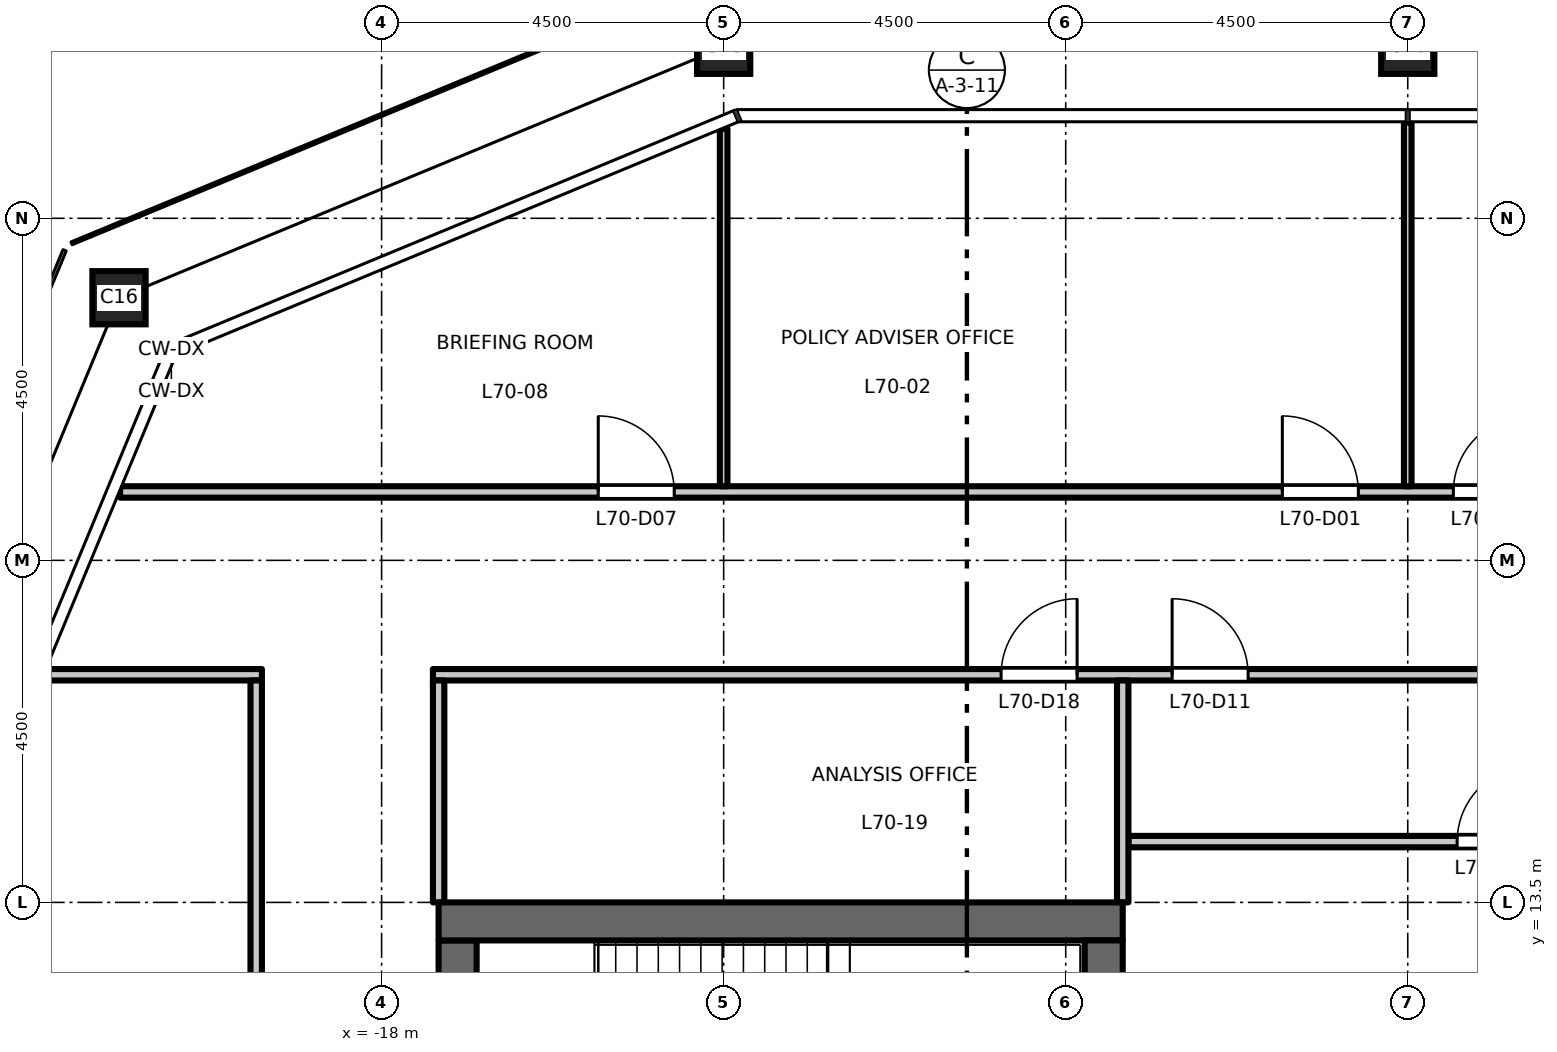
"""IFC4 building model, lengths in metres.
Left out: names, types, materials, properties, quantities, classifications, styles, units other than length and angle.
Written with IfcOpenShell. Run it as: python <this file> out.ifc"""

import sys

from ifc_helpers import new_model, si_unit, direction, frame, frame_2d, origin, origin_2d, place, context, subcontext, project, spatial, rectangle, hollow_rectangle, extrude, element, fill, save


model = new_model("IFC4")
c1 = context("Model", 3, precision=1e-05, world=origin(), true_north=direction((0.0, 1.0)))
c2 = subcontext(c1, "Body", "Model", "MODEL_VIEW")
j1 = project(units=[si_unit("LENGTHUNIT", "METRE"), si_unit("PLANEANGLEUNIT", "RADIAN")], contexts=[c1])
p1 = place(None, origin())
s1 = spatial("IfcSite", under=j1, at=p1, CompositionType="ELEMENT")
p2 = place(p1, origin())
s2 = spatial("IfcBuilding", under=s1, at=p2, CompositionType="ELEMENT")
p3 = place(p2, frame((0.0, 0.0, 325.7)))
s3 = spatial("IfcBuildingStorey", under=s2, at=p3, CompositionType="ELEMENT", Elevation=325.7)
for number, where, z_axis, x_axis in (
    (1, (-4.5, 24.75, 0.0), (0.0, 0.0, 1.0), (1.0, 0.0, 0.0)),
    (2, (-13.5, 24.75, 0.0), (0.0, 0.0, 1.0), (1.0, 0.0, 0.0)),
    (3, (-21.455, 21.455, 0.0), (0.0, 0.0, 1.0), (1.0, 0.0, 0.0)),
):
    element("IfcColumn", number, at=place(p3, frame(where, z_axis=z_axis, x_axis=x_axis)), inside=s3, PredefinedType="COLUMN", context=c2, shape_type="SweptSolid", body=[
        extrude(hollow_rectangle(XDim=0.7, YDim=0.7, WallThickness=0.036, at=origin_2d()), origin(), (0.0, 0.0, 1.0), 4.5),
    ])
p4 = place(p3, frame((-17.0, -13.0, 0.0), z_axis=(0.0, 0.0, 1.0), x_axis=(0.0, 1.0, 0.0)))
e4 = element("IfcWall", 4, at=p4, inside=s3, PredefinedType="SHEAR", context=c2, shape_type="SweptSolid", body=[
    extrude(rectangle(XDim=26.0, YDim=0.5, at=frame_2d((13.0, 0.0))), origin(), (0.0, 0.0, 1.0), 4.35),
])
p5 = place(p4, frame((16.825, 0.0, 0.0)))
e5 = element("IfcOpeningElement", 5, at=p5, cuts=e4, PredefinedType="OPENING", context=c2, shape_type="SweptSolid", body=[
    extrude(rectangle(XDim=1.8, YDim=2.1, at=frame_2d((0.9, 1.05))), frame((0.0, 0.26, 0.0), z_axis=(0.0, -1.0, 0.0), x_axis=(1.0, 0.0, 0.0)), (0.0, 0.0, 1.0), 0.52),
])
p6 = place(p4, frame((7.375, 0.0, 0.0)))
e6 = element("IfcOpeningElement", 6, at=p6, cuts=e4, PredefinedType="OPENING", context=c2, shape_type="SweptSolid", body=[
    extrude(rectangle(XDim=1.8, YDim=2.1, at=frame_2d((0.9, 1.05))), frame((0.0, 0.26, 0.0), z_axis=(0.0, -1.0, 0.0), x_axis=(1.0, 0.0, 0.0)), (0.0, 0.0, 1.0), 0.52),
])
p7 = place(p3, frame((-8.25, 13.25, 0.0), z_axis=(0.0, 0.0, 1.0), x_axis=(-1.0, 0.0, 0.0)))
e7 = element("IfcWall", 7, at=p7, inside=s3, PredefinedType="SHEAR", context=c2, shape_type="SweptSolid", body=[
    extrude(rectangle(XDim=9.0, YDim=0.5, at=frame_2d((4.5, 0.0))), origin(), (0.0, 0.0, 1.0), 4.35),
])
p8 = place(p3, frame((-8.5, -13.0, 0.0), z_axis=(0.0, 0.0, 1.0), x_axis=(0.0, 1.0, 0.0)))
e8 = element("IfcWall", 8, at=p8, inside=s3, PredefinedType="SHEAR", context=c2, shape_type="SweptSolid", body=[
    extrude(rectangle(XDim=26.0, YDim=0.5, at=frame_2d((13.0, 0.0))), origin(), (0.0, 0.0, 1.0), 4.35),
])
p9 = place(p3, frame((-8.175, 14.3, 0.0), z_axis=(0.0, 0.0, 1.0), x_axis=(1.0, 0.0, 0.0)))
e9 = element("IfcWall", 9, at=p9, inside=s3, PredefinedType="PARTITIONING", context=c2, shape_type="SweptSolid", body=[
    extrude(rectangle(XDim=14.835, YDim=0.15, at=frame_2d((7.417, 0.0))), origin(), (0.0, 0.0, 1.0), 4.35),
])
p10 = place(p9, frame((4.325, 0.0, 0.0)))
e10 = element("IfcOpeningElement", 10, at=p10, cuts=e9, PredefinedType="OPENING", context=c2, shape_type="SweptSolid", body=[
    extrude(rectangle(XDim=1.0, YDim=2.1, at=frame_2d((0.5, 1.05))), frame((0.0, 0.085, 0.0), z_axis=(0.0, -1.0, 0.0), x_axis=(1.0, 0.0, 0.0)), (0.0, 0.0, 1.0), 0.17),
])
p11 = place(p9, frame((6.575, 0.0, 0.0)))
e11 = element("IfcOpeningElement", 11, at=p11, cuts=e9, PredefinedType="OPENING", context=c2, shape_type="SweptSolid", body=[
    extrude(rectangle(XDim=1.0, YDim=2.1, at=frame_2d((0.5, 1.05))), frame((0.0, 0.085, 0.0), z_axis=(0.0, -1.0, 0.0), x_axis=(1.0, 0.0, 0.0)), (0.0, 0.0, 1.0), 0.17),
])
p12 = place(p9, frame((13.325, 0.0, 0.0)))
e12 = element("IfcOpeningElement", 12, at=p12, cuts=e9, PredefinedType="OPENING", context=c2, shape_type="SweptSolid", body=[
    extrude(rectangle(XDim=1.0, YDim=2.1, at=frame_2d((0.5, 1.05))), frame((0.0, 0.085, 0.0), z_axis=(0.0, -1.0, 0.0), x_axis=(1.0, 0.0, 0.0)), (0.0, 0.0, 1.0), 0.17),
])
p13 = place(p3, frame((-22.436, 16.495, 0.0), z_axis=(0.0, 0.0, 1.0), x_axis=(1.0, 0.0, 0.0)))
e13 = element("IfcWall", 13, at=p13, inside=s3, PredefinedType="PARTITIONING", context=c2, shape_type="SweptSolid", body=[
    extrude(rectangle(XDim=2.861, YDim=0.15, at=frame_2d((1.431, 0.0))), origin(), (0.0, 0.0, 1.0), 4.35),
])
p14 = place(p3, frame((-17.325, 16.495, 0.0), z_axis=(0.0, 0.0, 1.0), x_axis=(1.0, 0.0, 0.0)))
e14 = element("IfcWall", 14, at=p14, inside=s3, PredefinedType="PARTITIONING", context=c2, shape_type="SweptSolid", body=[
    extrude(rectangle(XDim=34.65, YDim=0.15, at=frame_2d((17.325, 0.0))), origin(), (0.0, 0.0, 1.0), 4.35),
])
p15 = place(p14, frame((9.725, 0.0, 0.0)))
e15 = element("IfcOpeningElement", 15, at=p15, cuts=e14, PredefinedType="OPENING", context=c2, shape_type="SweptSolid", body=[
    extrude(rectangle(XDim=1.0, YDim=2.1, at=frame_2d((0.5, 1.05))), frame((0.0, 0.085, 0.0), z_axis=(0.0, -1.0, 0.0), x_axis=(1.0, 0.0, 0.0)), (0.0, 0.0, 1.0), 0.17),
])
p16 = place(p14, frame((7.475, 0.0, 0.0)))
e16 = element("IfcOpeningElement", 16, at=p16, cuts=e14, PredefinedType="OPENING", context=c2, shape_type="SweptSolid", body=[
    extrude(rectangle(XDim=1.0, YDim=2.1, at=frame_2d((0.5, 1.05))), frame((0.0, 0.085, 0.0), z_axis=(0.0, -1.0, 0.0), x_axis=(1.0, 0.0, 0.0)), (0.0, 0.0, 1.0), 0.17),
])
p17 = place(p14, frame((26.225, 0.0, 0.0)))
e17 = element("IfcOpeningElement", 17, at=p17, cuts=e14, PredefinedType="OPENING", context=c2, shape_type="SweptSolid", body=[
    extrude(rectangle(XDim=1.0, YDim=2.1, at=frame_2d((0.5, 1.05))), frame((0.0, 0.085, 0.0), z_axis=(0.0, -1.0, 0.0), x_axis=(1.0, 0.0, 0.0)), (0.0, 0.0, 1.0), 0.17),
])
p18 = place(p3, frame((-21.441, 18.9, 0.0), z_axis=(0.0, 0.0, 1.0), x_axis=(1.0, 0.0, 0.0)))
e18 = element("IfcWall", 18, at=p18, inside=s3, PredefinedType="PARTITIONING", context=c2, shape_type="SweptSolid", body=[
    extrude(rectangle(XDim=40.944, YDim=0.15, at=frame_2d((20.472, 0.0))), origin(), (0.0, 0.0, 1.0), 4.35),
])
p19 = place(p18, frame((15.291, 0.0, 0.0)))
e19 = element("IfcOpeningElement", 19, at=p19, cuts=e18, PredefinedType="OPENING", context=c2, shape_type="SweptSolid", body=[
    extrude(rectangle(XDim=1.0, YDim=2.1, at=frame_2d((0.5, 1.05))), frame((0.0, 0.085, 0.0), z_axis=(0.0, -1.0, 0.0), x_axis=(1.0, 0.0, 0.0)), (0.0, 0.0, 1.0), 0.17),
])
p20 = place(p18, frame((17.541, 0.0, 0.0)))
e20 = element("IfcOpeningElement", 20, at=p20, cuts=e18, PredefinedType="OPENING", context=c2, shape_type="SweptSolid", body=[
    extrude(rectangle(XDim=1.0, YDim=2.1, at=frame_2d((0.5, 1.05))), frame((0.0, 0.085, 0.0), z_axis=(0.0, -1.0, 0.0), x_axis=(1.0, 0.0, 0.0)), (0.0, 0.0, 1.0), 0.17),
])
p21 = place(p18, frame((33.291, 0.0, 0.0)))
e21 = element("IfcOpeningElement", 21, at=p21, cuts=e18, PredefinedType="OPENING", context=c2, shape_type="SweptSolid", body=[
    extrude(rectangle(XDim=1.0, YDim=2.1, at=frame_2d((0.5, 1.05))), frame((0.0, 0.085, 0.0), z_axis=(0.0, -1.0, 0.0), x_axis=(1.0, 0.0, 0.0)), (0.0, 0.0, 1.0), 0.17),
])
p22 = place(p18, frame((6.291, 0.0, 0.0)))
e22 = element("IfcOpeningElement", 22, at=p22, cuts=e18, PredefinedType="OPENING", context=c2, shape_type="SweptSolid", body=[
    extrude(rectangle(XDim=1.0, YDim=2.1, at=frame_2d((0.5, 1.05))), frame((0.0, 0.085, 0.0), z_axis=(0.0, -1.0, 0.0), x_axis=(1.0, 0.0, 0.0)), (0.0, 0.0, 1.0), 0.17),
])
p23 = place(p18, frame((35.469, 0.0, 0.0)))
e23 = element("IfcOpeningElement", 23, at=p23, cuts=e18, PredefinedType="OPENING", context=c2, shape_type="SweptSolid", body=[
    extrude(rectangle(XDim=1.0, YDim=2.1, at=frame_2d((0.5, 1.05))), frame((0.0, 0.085, 0.0), z_axis=(0.0, -1.0, 0.0), x_axis=(1.0, 0.0, 0.0)), (0.0, 0.0, 1.0), 0.17),
])
p24 = place(p3, frame((-19.65, -16.425, 0.0), z_axis=(0.0, 0.0, 1.0), x_axis=(0.0, 1.0, 0.0)))
e24 = element("IfcWall", 24, at=p24, inside=s3, PredefinedType="PARTITIONING", context=c2, shape_type="SweptSolid", body=[
    extrude(rectangle(XDim=32.845, YDim=0.15, at=frame_2d((16.422, 0.0))), origin(), (0.0, 0.0, 1.0), 4.35),
])
p25 = place(p24, frame((0.52, 0.0, 0.0)))
e25 = element("IfcOpeningElement", 25, at=p25, cuts=e24, PredefinedType="OPENING", context=c2, shape_type="SweptSolid", body=[
    extrude(rectangle(XDim=1.0, YDim=2.1, at=frame_2d((0.5, 1.05))), frame((0.0, 0.085, 0.0), z_axis=(0.0, -1.0, 0.0), x_axis=(1.0, 0.0, 0.0)), (0.0, 0.0, 1.0), 0.17),
])
p26 = place(p3, frame((-17.25, 13.5, 0.0), z_axis=(0.0, 0.0, 1.0), x_axis=(0.0, 1.0, 0.0)))
e26 = element("IfcWall", 26, at=p26, inside=s3, PredefinedType="PARTITIONING", context=c2, shape_type="SweptSolid", body=[
    extrude(rectangle(XDim=2.92, YDim=0.15, at=frame_2d((1.46, 0.0))), origin(), (0.0, 0.0, 1.0), 4.35),
])
p27 = place(p3, frame((-13.5, 18.975, 0.0), z_axis=(0.0, 0.0, 1.0), x_axis=(0.0, 1.0, 0.0)))
e27 = element("IfcWall", 27, at=p27, inside=s3, PredefinedType="PARTITIONING", context=c2, shape_type="SweptSolid", body=[
    extrude(rectangle(XDim=4.703, YDim=0.1, at=frame_2d((2.352, 0.0))), origin(), (0.0, 0.0, 1.0), 3.75),
])
p28 = place(p3, frame((-8.25, 13.5, 0.0), z_axis=(0.0, 0.0, 1.0), x_axis=(0.0, 1.0, 0.0)))
e28 = element("IfcWall", 28, at=p28, inside=s3, PredefinedType="PARTITIONING", context=c2, shape_type="SweptSolid", body=[
    extrude(rectangle(XDim=2.92, YDim=0.15, at=frame_2d((1.46, 0.0))), origin(), (0.0, 0.0, 1.0), 4.35),
])
p29 = place(p3, frame((-4.5, 18.975, 0.0), z_axis=(0.0, 0.0, 1.0), x_axis=(0.0, 1.0, 0.0)))
e29 = element("IfcWall", 29, at=p29, inside=s3, PredefinedType="PARTITIONING", context=c2, shape_type="SweptSolid", body=[
    extrude(rectangle(XDim=4.785, YDim=0.1, at=frame_2d((2.393, 0.0))), origin(), (0.0, 0.0, 1.0), 3.65),
])
p30 = place(p19, origin())
e30 = element("IfcDoor", 30, at=p30, inside=s3, OperationType="SINGLE_SWING_LEFT", PredefinedType="DOOR", context=c2, shape_type="SweptSolid", body=[
    extrude(rectangle(XDim=1.0, YDim=2.1, at=frame_2d((0.5, 1.05))), frame((0.0, 0.025, 0.0), z_axis=(0.0, -1.0, 0.0), x_axis=(1.0, 0.0, 0.0)), (0.0, 0.0, 1.0), 0.05),
])
fill(e19, e30)
p31 = place(p20, origin())
e31 = element("IfcDoor", 31, at=p31, inside=s3, OperationType="SINGLE_SWING_RIGHT", PredefinedType="DOOR", context=c2, shape_type="SweptSolid", body=[
    extrude(rectangle(XDim=1.0, YDim=2.1, at=frame_2d((0.5, 1.05))), frame((0.0, 0.025, 0.0), z_axis=(0.0, -1.0, 0.0), x_axis=(1.0, 0.0, 0.0)), (0.0, 0.0, 1.0), 0.05),
])
fill(e20, e31)
p32 = place(p22, origin())
e32 = element("IfcDoor", 32, at=p32, inside=s3, OperationType="SINGLE_SWING_LEFT", PredefinedType="DOOR", context=c2, shape_type="SweptSolid", body=[
    extrude(rectangle(XDim=1.0, YDim=2.1, at=frame_2d((0.5, 1.05))), frame((0.0, 0.025, 0.0), z_axis=(0.0, -1.0, 0.0), x_axis=(1.0, 0.0, 0.0)), (0.0, 0.0, 1.0), 0.05),
])
fill(e22, e32)
p33 = place(p15, origin())
e33 = element("IfcDoor", 33, at=p33, inside=s3, OperationType="SINGLE_SWING_LEFT", PredefinedType="DOOR", context=c2, shape_type="SweptSolid", body=[
    extrude(rectangle(XDim=1.0, YDim=2.1, at=frame_2d((0.5, 1.05))), frame((0.0, 0.025, 0.0), z_axis=(0.0, -1.0, 0.0), x_axis=(1.0, 0.0, 0.0)), (0.0, 0.0, 1.0), 0.05),
])
fill(e15, e33)
p34 = place(p10, origin())
e34 = element("IfcDoor", 34, at=p34, inside=s3, OperationType="SINGLE_SWING_RIGHT", PredefinedType="DOOR", context=c2, shape_type="SweptSolid", body=[
    extrude(rectangle(XDim=1.0, YDim=2.1, at=frame_2d((0.5, 1.05))), frame((0.0, 0.025, 0.0), z_axis=(0.0, -1.0, 0.0), x_axis=(1.0, 0.0, 0.0)), (0.0, 0.0, 1.0), 0.05),
])
fill(e10, e34)
p35 = place(p16, origin())
e35 = element("IfcDoor", 35, at=p35, inside=s3, OperationType="SINGLE_SWING_RIGHT", PredefinedType="DOOR", context=c2, shape_type="SweptSolid", body=[
    extrude(rectangle(XDim=1.0, YDim=2.1, at=frame_2d((0.5, 1.05))), frame((0.0, 0.025, 0.0), z_axis=(0.0, -1.0, 0.0), x_axis=(1.0, 0.0, 0.0)), (0.0, 0.0, 1.0), 0.05),
])
fill(e16, e35)
save(model, sys.argv[1])
